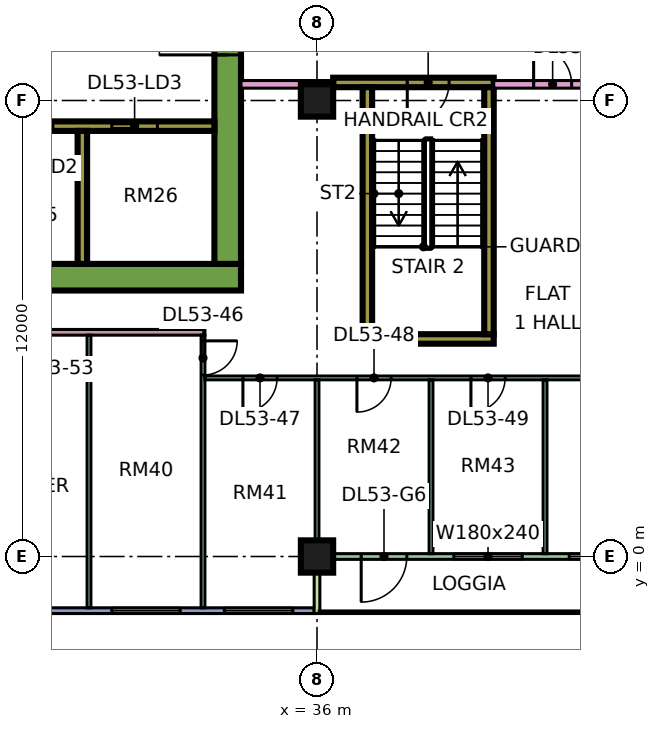
"""IFC4 building model, lengths in metres.
Left out: names, types, materials, properties, quantities, classifications, styles, units other than length and angle.
Written with IfcOpenShell. Run it as: python <this file> out.ifc"""

import sys

from ifc_helpers import new_model, si_unit, direction, frame, frame_2d, origin, origin_2d, place, context, subcontext, project, spatial, rectangle, extrude, element, fill, save


model = new_model("IFC4")
c1 = context("Model", 3, precision=1e-05, world=origin(), true_north=direction((0.0, 1.0)))
c2 = subcontext(c1, "Body", "Model", "MODEL_VIEW")
j1 = project(units=[si_unit("LENGTHUNIT", "METRE"), si_unit("PLANEANGLEUNIT", "RADIAN")], contexts=[c1])
p1 = place(None, origin())
s1 = spatial("IfcSite", under=j1, at=p1, CompositionType="ELEMENT")
p2 = place(p1, origin())
s2 = spatial("IfcBuilding", under=s1, at=p2, CompositionType="ELEMENT")
p3 = place(p2, frame((0.0, 0.0, 226.65)))
s3 = spatial("IfcBuildingStorey", under=s2, at=p3, CompositionType="ELEMENT", Elevation=226.65)
for number, where, z_axis, x_axis in (
    (1, (36.0, 0.0, 0.0), (0.0, 0.0, 1.0), (1.0, 0.0, 0.0)),
    (2, (36.0, 12.0, 0.0), (0.0, 0.0, 1.0), (1.0, 0.0, 0.0)),
):
    element("IfcColumn", number, at=place(p3, frame(where, z_axis=z_axis, x_axis=x_axis)), inside=s3, PredefinedType="COLUMN", context=c2, shape_type="SweptSolid", body=[
        extrude(rectangle(XDim=0.85, YDim=0.85, at=origin_2d()), origin(), (0.0, 0.0, 1.0), 3.75),
    ])
p4 = place(p3, frame((9.0, 7.35, 0.0), z_axis=(0.0, 0.0, 1.0), x_axis=(1.0, 0.0, 0.0)))
e3 = element("IfcWall", 3, at=p4, inside=s3, PredefinedType="SHEAR", context=c2, shape_type="SweptSolid", body=[
    extrude(rectangle(XDim=25.0, YDim=0.7, at=frame_2d((12.5, 0.0))), origin(), (0.0, 0.0, 1.0), 3.75),
])
p5 = place(p3, frame((33.65, 7.7, 0.0), z_axis=(0.0, 0.0, 1.0), x_axis=(0.0, 1.0, 0.0)))
e4 = element("IfcWall", 4, at=p5, inside=s3, PredefinedType="SHEAR", context=c2, shape_type="SweptSolid", body=[
    extrude(rectangle(XDim=11.6, YDim=0.7, at=frame_2d((5.8, 0.0))), origin(), (0.0, 0.0, 1.0), 3.75),
])
p6 = place(p5, frame((5.5, 0.0, 0.0)))
e5 = element("IfcOpeningElement", 5, at=p6, cuts=e4, PredefinedType="OPENING", context=c2, shape_type="SweptSolid", body=[
    extrude(rectangle(XDim=1.8, YDim=2.4, at=frame_2d((0.9, 1.2))), frame((0.0, 0.36, 0.0), z_axis=(0.0, -1.0, 0.0), x_axis=(1.0, 0.0, 0.0)), (0.0, 0.0, 1.0), 0.72),
])
p7 = place(p3, frame((13.45, 11.325, 0.0), z_axis=(0.0, 0.0, 1.0), x_axis=(1.0, 0.0, 0.0)))
e6 = element("IfcWall", 6, at=p7, inside=s3, PredefinedType="SHEAR", context=c2, shape_type="SweptSolid", body=[
    extrude(rectangle(XDim=19.85, YDim=0.25, at=frame_2d((9.925, 0.0))), origin(), (0.0, 0.0, 1.0), 3.75),
])
p8 = place(p7, frame((11.65, 0.0, 0.0)))
e7 = element("IfcOpeningElement", 7, at=p8, cuts=e6, PredefinedType="OPENING", context=c2, shape_type="SweptSolid", body=[
    extrude(rectangle(XDim=1.2, YDim=2.2, at=frame_2d((0.6, 1.1))), frame((0.0, 0.135, 0.0), z_axis=(0.0, -1.0, 0.0), x_axis=(1.0, 0.0, 0.0)), (0.0, 0.0, 1.0), 0.27),
])
p9 = place(p7, frame((14.4, 0.0, 0.0)))
e8 = element("IfcOpeningElement", 8, at=p9, cuts=e6, PredefinedType="OPENING", context=c2, shape_type="SweptSolid", body=[
    extrude(rectangle(XDim=1.2, YDim=2.2, at=frame_2d((0.6, 1.1))), frame((0.0, 0.135, 0.0), z_axis=(0.0, -1.0, 0.0), x_axis=(1.0, 0.0, 0.0)), (0.0, 0.0, 1.0), 0.27),
])
p10 = place(p7, frame((17.15, 0.0, 0.0)))
e9 = element("IfcOpeningElement", 9, at=p10, cuts=e6, PredefinedType="OPENING", context=c2, shape_type="SweptSolid", body=[
    extrude(rectangle(XDim=1.2, YDim=2.2, at=frame_2d((0.6, 1.1))), frame((0.0, 0.135, 0.0), z_axis=(0.0, -1.0, 0.0), x_axis=(1.0, 0.0, 0.0)), (0.0, 0.0, 1.0), 0.27),
])
p11 = place(p7, frame((4.925, 0.0, 0.0)))
e10 = element("IfcOpeningElement", 10, at=p11, cuts=e6, PredefinedType="OPENING", context=c2, shape_type="SweptSolid", body=[
    extrude(rectangle(XDim=0.9, YDim=2.1, at=frame_2d((0.45, 1.05))), frame((0.0, 0.135, 0.0), z_axis=(0.0, -1.0, 0.0), x_axis=(1.0, 0.0, 0.0)), (0.0, 0.0, 1.0), 0.27),
])
p12 = place(p3, frame((29.825, 7.7, 0.0), z_axis=(0.0, 0.0, 1.0), x_axis=(0.0, 1.0, 0.0)))
e11 = element("IfcWall", 11, at=p12, inside=s3, PredefinedType="SHEAR", context=c2, shape_type="SweptSolid", body=[
    extrude(rectangle(XDim=3.5, YDim=0.25, at=frame_2d((1.75, 0.0))), origin(), (0.0, 0.0, 1.0), 3.75),
])
p13 = place(p3, frame((37.2, 5.725, 0.0), z_axis=(0.0, 0.0, 1.0), x_axis=(1.0, 0.0, 0.0)))
e12 = element("IfcWall", 12, at=p13, inside=s3, PredefinedType="SHEAR", context=c2, shape_type="SweptSolid", body=[
    extrude(rectangle(XDim=3.45, YDim=0.25, at=frame_2d((1.725, 0.0))), origin(), (0.0, 0.0, 1.0), 3.75),
])
p14 = place(p3, frame((36.425, 12.475, 0.0), z_axis=(0.0, 0.0, 1.0), x_axis=(1.0, 0.0, 0.0)))
e13 = element("IfcWall", 13, at=p14, inside=s3, PredefinedType="SHEAR", context=c2, shape_type="SweptSolid", body=[
    extrude(rectangle(XDim=4.225, YDim=0.25, at=frame_2d((2.112, 0.0))), origin(), (0.0, 0.0, 1.0), 3.75),
])
p15 = place(p14, frame((1.95, 0.0, 0.0)))
e14 = element("IfcOpeningElement", 14, at=p15, cuts=e13, PredefinedType="OPENING", context=c2, shape_type="SweptSolid", body=[
    extrude(rectangle(XDim=1.1, YDim=2.2, at=frame_2d((0.55, 1.1))), frame((0.0, 0.135, 0.0), z_axis=(0.0, -1.0, 0.0), x_axis=(1.0, 0.0, 0.0)), (0.0, 0.0, 1.0), 0.27),
])
for number, where, z_axis, x_axis in (
    (15, (37.325, 5.85, 0.0), (0.0, 0.0, 1.0), (0.0, 1.0, 0.0)),
    (16, (40.525, 5.85, 0.0), (0.0, 0.0, 1.0), (0.0, 1.0, 0.0)),
):
    element("IfcWall", number, at=place(p3, frame(where, z_axis=z_axis, x_axis=x_axis)), inside=s3, PredefinedType="SHEAR", context=c2, shape_type="SweptSolid", body=[
        extrude(rectangle(XDim=6.5, YDim=0.25, at=frame_2d((3.25, 0.0))), origin(), (0.0, 0.0, 1.0), 3.75),
    ])
p16 = place(p3, frame((24.075, -1.425, 0.0), z_axis=(0.0, 0.0, 1.0), x_axis=(1.0, 0.0, 0.0)))
e17 = element("IfcWall", 17, at=p16, inside=s3, PredefinedType="SOLIDWALL", context=c2, shape_type="SweptSolid", body=[
    extrude(rectangle(XDim=11.85, YDim=0.15, at=frame_2d((5.925, 0.0))), origin(), (0.0, 0.0, 1.0), 3.35),
])
p17 = place(p16, frame((1.462, 0.0, 0.45)))
e18 = element("IfcOpeningElement", 18, at=p17, cuts=e17, PredefinedType="OPENING", context=c2, shape_type="SweptSolid", body=[
    extrude(rectangle(XDim=3.0, YDim=2.4, at=frame_2d((1.5, 1.2))), frame((0.0, 0.085, 0.0), z_axis=(0.0, -1.0, 0.0), x_axis=(1.0, 0.0, 0.0)), (0.0, 0.0, 1.0), 0.17),
])
p18 = place(p16, frame((6.525, 0.0, 0.45)))
e19 = element("IfcOpeningElement", 19, at=p18, cuts=e17, PredefinedType="OPENING", context=c2, shape_type="SweptSolid", body=[
    extrude(rectangle(XDim=1.8, YDim=2.4, at=frame_2d((0.9, 1.2))), frame((0.0, 0.085, 0.0), z_axis=(0.0, -1.0, 0.0), x_axis=(1.0, 0.0, 0.0)), (0.0, 0.0, 1.0), 0.17),
])
p19 = place(p16, frame((9.488, 0.0, 0.45)))
e20 = element("IfcOpeningElement", 20, at=p19, cuts=e17, PredefinedType="OPENING", context=c2, shape_type="SweptSolid", body=[
    extrude(rectangle(XDim=1.8, YDim=2.4, at=frame_2d((0.9, 1.2))), frame((0.0, 0.085, 0.0), z_axis=(0.0, -1.0, 0.0), x_axis=(1.0, 0.0, 0.0)), (0.0, 0.0, 1.0), 0.17),
])
p20 = place(p3, frame((36.075, 0.0, 0.0), z_axis=(0.0, 0.0, 1.0), x_axis=(1.0, 0.0, 0.0)))
e21 = element("IfcWall", 21, at=p20, inside=s3, PredefinedType="SOLIDWALL", context=c2, shape_type="SweptSolid", body=[
    extrude(rectangle(XDim=11.85, YDim=0.15, at=frame_2d((5.925, 0.0))), origin(), (0.0, 0.0, 1.0), 3.35),
])
p21 = place(p20, frame((1.087, 0.0, 0.0)))
e22 = element("IfcOpeningElement", 22, at=p21, cuts=e21, PredefinedType="OPENING", context=c2, shape_type="SweptSolid", body=[
    extrude(rectangle(XDim=1.2, YDim=2.4, at=frame_2d((0.6, 1.2))), frame((0.0, 0.085, 0.0), z_axis=(0.0, -1.0, 0.0), x_axis=(1.0, 0.0, 0.0)), (0.0, 0.0, 1.0), 0.17),
])
p22 = place(p20, frame((3.525, 0.0, 0.45)))
e23 = element("IfcOpeningElement", 23, at=p22, cuts=e21, PredefinedType="OPENING", context=c2, shape_type="SweptSolid", body=[
    extrude(rectangle(XDim=1.8, YDim=2.4, at=frame_2d((0.9, 1.2))), frame((0.0, 0.085, 0.0), z_axis=(0.0, -1.0, 0.0), x_axis=(1.0, 0.0, 0.0)), (0.0, 0.0, 1.0), 0.17),
])
p23 = place(p20, frame((6.562, 0.0, 0.45)))
e24 = element("IfcOpeningElement", 24, at=p23, cuts=e21, PredefinedType="OPENING", context=c2, shape_type="SweptSolid", body=[
    extrude(rectangle(XDim=1.2, YDim=2.4, at=frame_2d((0.6, 1.2))), frame((0.0, 0.085, 0.0), z_axis=(0.0, -1.0, 0.0), x_axis=(1.0, 0.0, 0.0)), (0.0, 0.0, 1.0), 0.17),
])
p24 = place(p20, frame((10.05, 0.0, 0.45)))
e25 = element("IfcOpeningElement", 25, at=p24, cuts=e21, PredefinedType="OPENING", context=c2, shape_type="SweptSolid", body=[
    extrude(rectangle(XDim=1.2, YDim=2.4, at=frame_2d((0.6, 1.2))), frame((0.0, 0.085, 0.0), z_axis=(0.0, -1.0, 0.0), x_axis=(1.0, 0.0, 0.0)), (0.0, 0.0, 1.0), 0.17),
])
p25 = place(p3, frame((36.0, -1.5, 0.0), z_axis=(0.0, 0.0, 1.0), x_axis=(0.0, 1.0, 0.0)))
e26 = element("IfcWall", 26, at=p25, inside=s3, PredefinedType="SOLIDWALL", context=c2, shape_type="SweptSolid", body=[
    extrude(rectangle(XDim=1.5, YDim=0.15, at=frame_2d((0.75, 0.0))), origin(), (0.0, 0.0, 1.0), 3.35),
])
p26 = place(p3, frame((11.95, 5.9, 0.0), z_axis=(0.0, 0.0, 1.0), x_axis=(1.0, 0.0, 0.0)))
e27 = element("IfcWall", 27, at=p26, inside=s3, PredefinedType="PARTITIONING", context=c2, shape_type="SweptSolid", body=[
    extrude(rectangle(XDim=21.1, YDim=0.15, at=frame_2d((10.55, 0.0))), origin(), (0.0, 0.0, 1.0), 3.35),
])
p27 = place(p26, frame((10.1, 0.0, 0.0)))
e28 = element("IfcOpeningElement", 28, at=p27, cuts=e27, PredefinedType="OPENING", context=c2, shape_type="SweptSolid", body=[
    extrude(rectangle(XDim=0.9, YDim=2.1, at=frame_2d((0.45, 1.05))), frame((0.0, 0.085, 0.0), z_axis=(0.0, -1.0, 0.0), x_axis=(1.0, 0.0, 0.0)), (0.0, 0.0, 1.0), 0.17),
])
p28 = place(p26, frame((16.1, 0.0, 0.0)))
e29 = element("IfcOpeningElement", 29, at=p28, cuts=e27, PredefinedType="OPENING", context=c2, shape_type="SweptSolid", body=[
    extrude(rectangle(XDim=0.9, YDim=2.1, at=frame_2d((0.45, 1.05))), frame((0.0, 0.085, 0.0), z_axis=(0.0, -1.0, 0.0), x_axis=(1.0, 0.0, 0.0)), (0.0, 0.0, 1.0), 0.17),
])
p29 = place(p26, frame((4.1, 0.0, 0.0)))
e30 = element("IfcOpeningElement", 30, at=p29, cuts=e27, PredefinedType="OPENING", context=c2, shape_type="SweptSolid", body=[
    extrude(rectangle(XDim=0.9, YDim=2.1, at=frame_2d((0.45, 1.05))), frame((0.0, 0.085, 0.0), z_axis=(0.0, -1.0, 0.0), x_axis=(1.0, 0.0, 0.0)), (0.0, 0.0, 1.0), 0.17),
])
p30 = place(p3, frame((30.0, -1.351, 0.0), z_axis=(0.0, 0.0, 1.0), x_axis=(0.0, 1.0, 0.0)))
e31 = element("IfcWall", 31, at=p30, inside=s3, PredefinedType="PARTITIONING", context=c2, shape_type="SweptSolid", body=[
    extrude(rectangle(XDim=7.176, YDim=0.1, at=frame_2d((3.588, 0.0))), origin(), (0.0, 0.0, 1.0), 3.35),
])
p31 = place(p3, frame((33.0, -1.351, 0.0), z_axis=(0.0, 0.0, 1.0), x_axis=(0.0, 1.0, 0.0)))
e32 = element("IfcWall", 32, at=p31, inside=s3, PredefinedType="PARTITIONING", context=c2, shape_type="SweptSolid", body=[
    extrude(rectangle(XDim=7.176, YDim=0.1, at=frame_2d((3.588, 0.0))), origin(), (0.0, 0.0, 1.0), 3.35),
])
p32 = place(p31, frame((6.126, 0.0, 0.0)))
e33 = element("IfcOpeningElement", 33, at=p32, cuts=e32, PredefinedType="OPENING", context=c2, shape_type="SweptSolid", body=[
    extrude(rectangle(XDim=0.9, YDim=2.1, at=frame_2d((0.45, 1.05))), frame((0.0, 0.06, 0.0), z_axis=(0.0, -1.0, 0.0), x_axis=(1.0, 0.0, 0.0)), (0.0, 0.0, 1.0), 0.12),
])
p33 = place(p3, frame((33.05, 4.7, 0.0), z_axis=(0.0, 0.0, 1.0), x_axis=(1.0, 0.0, 0.0)))
e34 = element("IfcWall", 34, at=p33, inside=s3, PredefinedType="PARTITIONING", context=c2, shape_type="SweptSolid", body=[
    extrude(rectangle(XDim=20.85, YDim=0.1, at=frame_2d((10.425, 0.0))), origin(), (0.0, 0.0, 1.0), 3.35),
])
p34 = place(p33, frame((1.0, 0.0, 0.0)))
e35 = element("IfcOpeningElement", 35, at=p34, cuts=e34, PredefinedType="OPENING", context=c2, shape_type="SweptSolid", body=[
    extrude(rectangle(XDim=0.9, YDim=2.1, at=frame_2d((0.45, 1.05))), frame((0.0, 0.06, 0.0), z_axis=(0.0, -1.0, 0.0), x_axis=(1.0, 0.0, 0.0)), (0.0, 0.0, 1.0), 0.12),
])
p35 = place(p33, frame((4.0, 0.0, 0.0)))
e36 = element("IfcOpeningElement", 36, at=p35, cuts=e34, PredefinedType="OPENING", context=c2, shape_type="SweptSolid", body=[
    extrude(rectangle(XDim=0.9, YDim=2.1, at=frame_2d((0.45, 1.05))), frame((0.0, 0.06, 0.0), z_axis=(0.0, -1.0, 0.0), x_axis=(1.0, 0.0, 0.0)), (0.0, 0.0, 1.0), 0.12),
])
p36 = place(p33, frame((7.0, 0.0, 0.0)))
e37 = element("IfcOpeningElement", 37, at=p36, cuts=e34, PredefinedType="OPENING", context=c2, shape_type="SweptSolid", body=[
    extrude(rectangle(XDim=0.9, YDim=2.1, at=frame_2d((0.45, 1.05))), frame((0.0, 0.06, 0.0), z_axis=(0.0, -1.0, 0.0), x_axis=(1.0, 0.0, 0.0)), (0.0, 0.0, 1.0), 0.12),
])
p37 = place(p33, frame((19.0, 0.0, 0.0)))
e38 = element("IfcOpeningElement", 38, at=p37, cuts=e34, PredefinedType="OPENING", context=c2, shape_type="SweptSolid", body=[
    extrude(rectangle(XDim=0.9, YDim=2.1, at=frame_2d((0.45, 1.05))), frame((0.0, 0.06, 0.0), z_axis=(0.0, -1.0, 0.0), x_axis=(1.0, 0.0, 0.0)), (0.0, 0.0, 1.0), 0.12),
])
p38 = place(p33, frame((13.0, 0.0, 0.0)))
e39 = element("IfcOpeningElement", 39, at=p38, cuts=e34, PredefinedType="OPENING", context=c2, shape_type="SweptSolid", body=[
    extrude(rectangle(XDim=0.9, YDim=2.1, at=frame_2d((0.45, 1.05))), frame((0.0, 0.06, 0.0), z_axis=(0.0, -1.0, 0.0), x_axis=(1.0, 0.0, 0.0)), (0.0, 0.0, 1.0), 0.12),
])
p39 = place(p3, frame((34.0, 12.425, 0.0), z_axis=(0.0, 0.0, 1.0), x_axis=(1.0, 0.0, 0.0)))
e40 = element("IfcWall", 40, at=p39, inside=s3, PredefinedType="PARTITIONING", context=c2, shape_type="SweptSolid", body=[
    extrude(rectangle(XDim=2.426, YDim=0.2, at=frame_2d((1.213, 0.0))), origin(), (0.0, 0.0, 1.0), 3.35),
])
p40 = place(p3, frame((36.0, 0.0, 0.0), z_axis=(0.0, 0.0, 1.0), x_axis=(0.0, 1.0, 0.0)))
e41 = element("IfcWall", 41, at=p40, inside=s3, PredefinedType="PARTITIONING", context=c2, shape_type="SweptSolid", body=[
    extrude(rectangle(XDim=4.65, YDim=0.1, at=frame_2d((2.325, 0.0))), origin(), (0.0, 0.0, 1.0), 3.35),
])
p41 = place(p3, frame((39.0, 0.074, 0.0), z_axis=(0.0, 0.0, 1.0), x_axis=(0.0, 1.0, 0.0)))
e42 = element("IfcWall", 42, at=p41, inside=s3, PredefinedType="PARTITIONING", context=c2, shape_type="SweptSolid", body=[
    extrude(rectangle(XDim=4.576, YDim=0.1, at=frame_2d((2.288, 0.0))), origin(), (0.0, 0.0, 1.0), 3.35),
])
p42 = place(p3, frame((40.65, 12.425, 0.0), z_axis=(0.0, 0.0, 1.0), x_axis=(1.0, 0.0, 0.0)))
e43 = element("IfcWall", 43, at=p42, inside=s3, PredefinedType="PARTITIONING", context=c2, shape_type="SweptSolid", body=[
    extrude(rectangle(XDim=22.276, YDim=0.2, at=frame_2d((11.138, 0.0))), origin(), (0.0, 0.0, 1.0), 3.35),
])
p43 = place(p42, frame((14.7, 0.0, 0.0)))
e44 = element("IfcOpeningElement", 44, at=p43, cuts=e43, PredefinedType="OPENING", context=c2, shape_type="SweptSolid", body=[
    extrude(rectangle(XDim=1.0, YDim=2.1, at=frame_2d((0.5, 1.05))), frame((0.0, 0.11, 0.0), z_axis=(0.0, -1.0, 0.0), x_axis=(1.0, 0.0, 0.0)), (0.0, 0.0, 1.0), 0.22),
])
p44 = place(p42, frame((1.05, 0.0, 0.0)))
e45 = element("IfcOpeningElement", 45, at=p44, cuts=e43, PredefinedType="OPENING", context=c2, shape_type="SweptSolid", body=[
    extrude(rectangle(XDim=1.0, YDim=2.1, at=frame_2d((0.5, 1.05))), frame((0.0, 0.11, 0.0), z_axis=(0.0, -1.0, 0.0), x_axis=(1.0, 0.0, 0.0)), (0.0, 0.0, 1.0), 0.22),
])
p45 = place(p3, frame((42.0, 0.074, 0.0), z_axis=(0.0, 0.0, 1.0), x_axis=(0.0, 1.0, 0.0)))
e46 = element("IfcWall", 46, at=p45, inside=s3, PredefinedType="PARTITIONING", context=c2, shape_type="SweptSolid", body=[
    extrude(rectangle(XDim=4.576, YDim=0.1, at=frame_2d((2.288, 0.0))), origin(), (0.0, 0.0, 1.0), 3.35),
])
p46 = place(p18, origin())
e47 = element("IfcWindow", 47, at=p46, inside=s3, PartitioningType="SINGLE_PANEL", PredefinedType="WINDOW", context=c2, shape_type="SweptSolid", body=[
    extrude(rectangle(XDim=1.8, YDim=2.4, at=frame_2d((0.9, 1.2))), frame((0.0, 0.03, 0.0), z_axis=(0.0, -1.0, 0.0), x_axis=(1.0, 0.0, 0.0)), (0.0, 0.0, 1.0), 0.06),
])
fill(e19, e47)
p47 = place(p19, origin())
e48 = element("IfcWindow", 48, at=p47, inside=s3, PartitioningType="SINGLE_PANEL", PredefinedType="WINDOW", context=c2, shape_type="SweptSolid", body=[
    extrude(rectangle(XDim=1.8, YDim=2.4, at=frame_2d((0.9, 1.2))), frame((0.0, 0.03, 0.0), z_axis=(0.0, -1.0, 0.0), x_axis=(1.0, 0.0, 0.0)), (0.0, 0.0, 1.0), 0.06),
])
fill(e20, e48)
p48 = place(p21, frame((1.2, 0.0, 0.0), z_axis=(0.0, 0.0, 1.0), x_axis=(-1.0, 0.0, 0.0)))
e49 = element("IfcDoor", 49, at=p48, inside=s3, OperationType="DOUBLE_DOOR_SINGLE_SWING", PredefinedType="DOOR", context=c2, shape_type="SweptSolid", body=[
    extrude(rectangle(XDim=1.2, YDim=2.4, at=frame_2d((0.6, 1.2))), frame((0.0, 0.025, 0.0), z_axis=(0.0, -1.0, 0.0), x_axis=(1.0, 0.0, 0.0)), (0.0, 0.0, 1.0), 0.05),
])
fill(e22, e49)
p49 = place(p22, origin())
e50 = element("IfcWindow", 50, at=p49, inside=s3, PartitioningType="SINGLE_PANEL", PredefinedType="WINDOW", context=c2, shape_type="SweptSolid", body=[
    extrude(rectangle(XDim=1.8, YDim=2.4, at=frame_2d((0.9, 1.2))), frame((0.0, 0.03, 0.0), z_axis=(0.0, -1.0, 0.0), x_axis=(1.0, 0.0, 0.0)), (0.0, 0.0, 1.0), 0.06),
])
fill(e23, e50)
p50 = place(p23, origin())
e51 = element("IfcWindow", 51, at=p50, inside=s3, PartitioningType="SINGLE_PANEL", PredefinedType="WINDOW", context=c2, shape_type="SweptSolid", body=[
    extrude(rectangle(XDim=1.2, YDim=2.4, at=frame_2d((0.6, 1.2))), frame((0.0, 0.03, 0.0), z_axis=(0.0, -1.0, 0.0), x_axis=(1.0, 0.0, 0.0)), (0.0, 0.0, 1.0), 0.06),
])
fill(e24, e51)
p51 = place(p9, origin())
e52 = element("IfcDoor", 52, at=p51, inside=s3, OperationType="DOUBLE_DOOR_SLIDING", PredefinedType="DOOR", context=c2, shape_type="SweptSolid", body=[
    extrude(rectangle(XDim=1.2, YDim=2.2, at=frame_2d((0.6, 1.1))), frame((0.0, 0.025, 0.0), z_axis=(0.0, -1.0, 0.0), x_axis=(1.0, 0.0, 0.0)), (0.0, 0.0, 1.0), 0.05),
])
fill(e8, e52)
p52 = place(p10, origin())
e53 = element("IfcDoor", 53, at=p52, inside=s3, OperationType="DOUBLE_DOOR_SLIDING", PredefinedType="DOOR", context=c2, shape_type="SweptSolid", body=[
    extrude(rectangle(XDim=1.2, YDim=2.2, at=frame_2d((0.6, 1.1))), frame((0.0, 0.025, 0.0), z_axis=(0.0, -1.0, 0.0), x_axis=(1.0, 0.0, 0.0)), (0.0, 0.0, 1.0), 0.05),
])
fill(e9, e53)
p53 = place(p6, origin())
e54 = element("IfcDoor", 54, at=p53, inside=s3, OperationType="DOUBLE_DOOR_SINGLE_SWING", PredefinedType="DOOR", context=c2, shape_type="SweptSolid", body=[
    extrude(rectangle(XDim=1.8, YDim=2.4, at=frame_2d((0.9, 1.2))), frame((0.0, 0.025, 0.0), z_axis=(0.0, -1.0, 0.0), x_axis=(1.0, 0.0, 0.0)), (0.0, 0.0, 1.0), 0.05),
])
fill(e5, e54)
p54 = place(p15, frame((1.1, 0.0, 0.0), z_axis=(0.0, 0.0, 1.0), x_axis=(-1.0, 0.0, 0.0)))
e55 = element("IfcDoor", 55, at=p54, inside=s3, OperationType="SINGLE_SWING_LEFT", PredefinedType="DOOR", context=c2, shape_type="SweptSolid", body=[
    extrude(rectangle(XDim=1.1, YDim=2.2, at=frame_2d((0.55, 1.1))), frame((0.0, 0.025, 0.0), z_axis=(0.0, -1.0, 0.0), x_axis=(1.0, 0.0, 0.0)), (0.0, 0.0, 1.0), 0.05),
])
fill(e14, e55)
p55 = place(p32, origin())
e56 = element("IfcDoor", 56, at=p55, inside=s3, OperationType="SINGLE_SWING_RIGHT", PredefinedType="DOOR", context=c2, shape_type="SweptSolid", body=[
    extrude(rectangle(XDim=0.9, YDim=2.1, at=frame_2d((0.45, 1.05))), frame((0.0, 0.025, 0.0), z_axis=(0.0, -1.0, 0.0), x_axis=(1.0, 0.0, 0.0)), (0.0, 0.0, 1.0), 0.05),
])
fill(e33, e56)
p56 = place(p34, frame((0.9, 0.0, 0.0), z_axis=(0.0, 0.0, 1.0), x_axis=(-1.0, 0.0, 0.0)))
e57 = element("IfcDoor", 57, at=p56, inside=s3, OperationType="SINGLE_SWING_LEFT", PredefinedType="DOOR", context=c2, shape_type="SweptSolid", body=[
    extrude(rectangle(XDim=0.9, YDim=2.1, at=frame_2d((0.45, 1.05))), frame((0.0, 0.025, 0.0), z_axis=(0.0, -1.0, 0.0), x_axis=(1.0, 0.0, 0.0)), (0.0, 0.0, 1.0), 0.05),
])
fill(e35, e57)
p57 = place(p35, frame((0.9, 0.0, 0.0), z_axis=(0.0, 0.0, 1.0), x_axis=(-1.0, 0.0, 0.0)))
e58 = element("IfcDoor", 58, at=p57, inside=s3, OperationType="SINGLE_SWING_LEFT", PredefinedType="DOOR", context=c2, shape_type="SweptSolid", body=[
    extrude(rectangle(XDim=0.9, YDim=2.1, at=frame_2d((0.45, 1.05))), frame((0.0, 0.025, 0.0), z_axis=(0.0, -1.0, 0.0), x_axis=(1.0, 0.0, 0.0)), (0.0, 0.0, 1.0), 0.05),
])
fill(e36, e58)
p58 = place(p36, frame((0.9, 0.0, 0.0), z_axis=(0.0, 0.0, 1.0), x_axis=(-1.0, 0.0, 0.0)))
e59 = element("IfcDoor", 59, at=p58, inside=s3, OperationType="SINGLE_SWING_LEFT", PredefinedType="DOOR", context=c2, shape_type="SweptSolid", body=[
    extrude(rectangle(XDim=0.9, YDim=2.1, at=frame_2d((0.45, 1.05))), frame((0.0, 0.025, 0.0), z_axis=(0.0, -1.0, 0.0), x_axis=(1.0, 0.0, 0.0)), (0.0, 0.0, 1.0), 0.05),
])
fill(e37, e59)
p59 = place(p44, origin())
e60 = element("IfcDoor", 60, at=p59, inside=s3, OperationType="SINGLE_SWING_LEFT", PredefinedType="DOOR", context=c2, shape_type="SweptSolid", body=[
    extrude(rectangle(XDim=1.0, YDim=2.1, at=frame_2d((0.5, 1.05))), frame((0.0, 0.025, 0.0), z_axis=(0.0, -1.0, 0.0), x_axis=(1.0, 0.0, 0.0)), (0.0, 0.0, 1.0), 0.05),
])
fill(e45, e60)
save(model, sys.argv[1])
